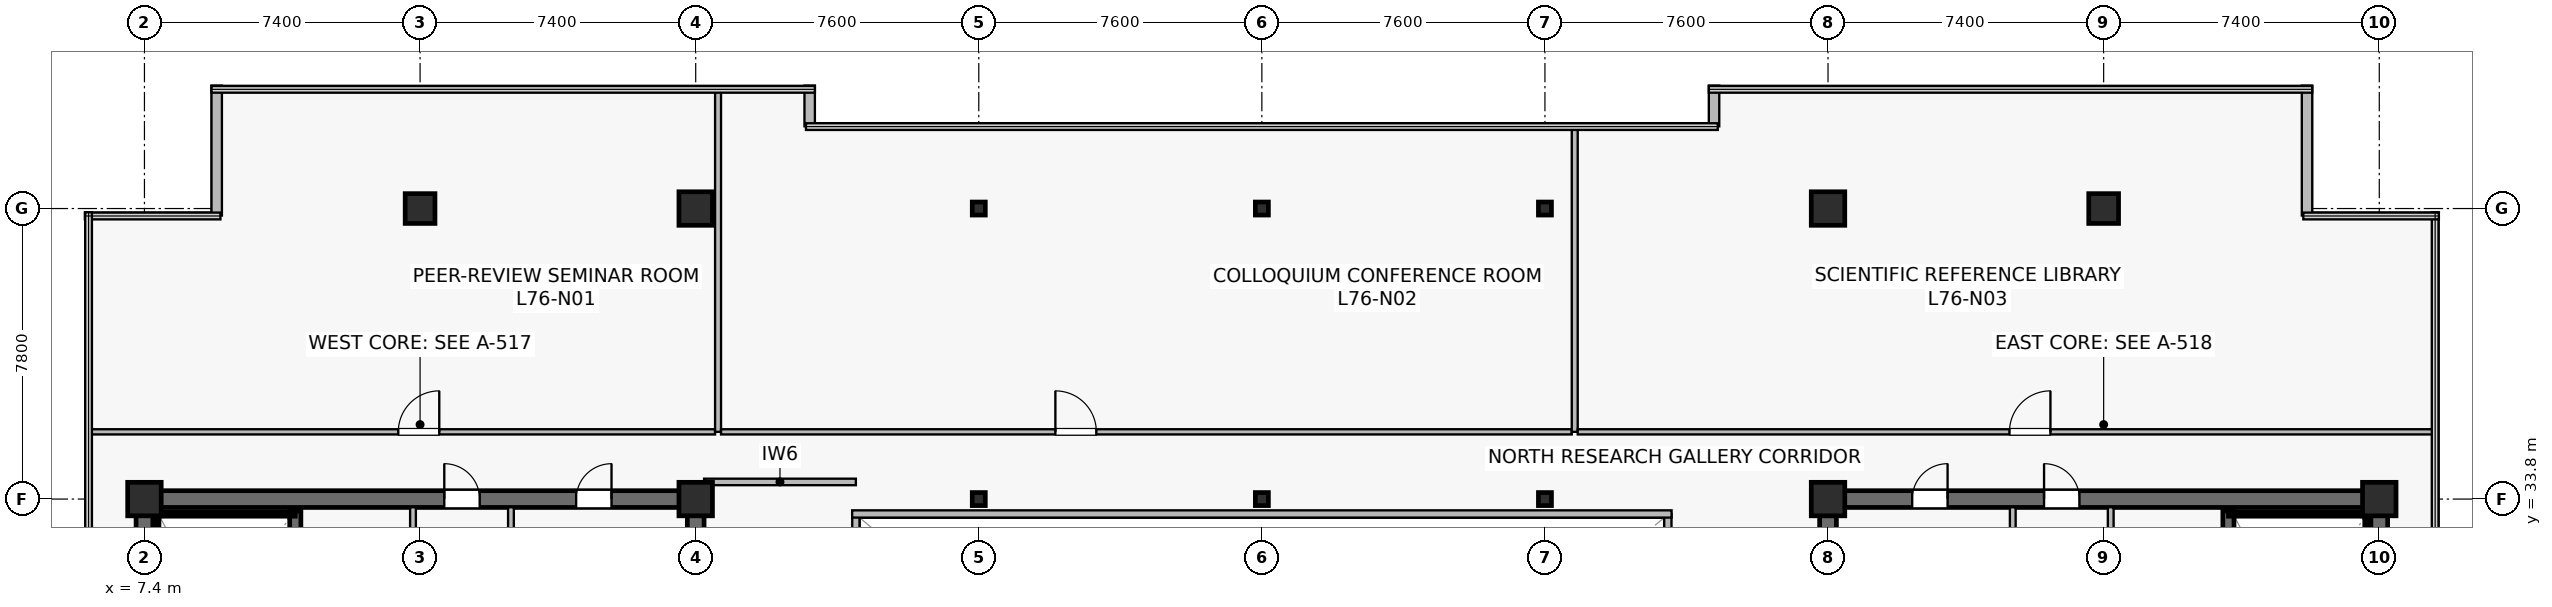
"""IFC4 building model, lengths in metres.
Left out: names, types, materials, properties, quantities, classifications, styles, units other than length and angle.
Written with IfcOpenShell. Run it as: python <this file> out.ifc"""

import sys

from ifc_helpers import new_model, si_unit, direction, frame, frame_2d, origin, origin_2d, place, context, subcontext, project, spatial, rectangle, i_section, extrude, source, transform, mapped, element, fill, save


model = new_model("IFC4")
c1 = context("Model", 3, precision=1e-05, world=origin(), true_north=direction((0.0, 1.0)))
c2 = subcontext(c1, "Body", "Model", "MODEL_VIEW")
j1 = project(units=[si_unit("LENGTHUNIT", "METRE"), si_unit("PLANEANGLEUNIT", "RADIAN")], contexts=[c1])
p1 = place(None, origin())
s1 = spatial("IfcSite", under=j1, at=p1, CompositionType="ELEMENT")
p2 = place(p1, origin())
s2 = spatial("IfcBuilding", under=s1, at=p2, CompositionType="ELEMENT")
p3 = place(p2, frame((0.0, 0.0, 318.6)))
s3 = spatial("IfcBuildingStorey", under=s2, at=p3, CompositionType="ELEMENT", Elevation=318.6)
p4 = place(p3, frame((7.175, 33.8, 0.0), z_axis=(0.0, 0.0, 1.0), x_axis=(1.0, 0.0, 0.0)))
e1 = element("IfcWall", 1, at=p4, inside=s3, PredefinedType="SHEAR", context=c2, shape_type="SweptSolid", body=[
    extrude(rectangle(XDim=15.25, YDim=0.45, at=frame_2d((7.625, 0.0))), origin(), (0.0, 0.0, 1.0), 3.9),
])
p5 = place(p4, frame((8.275, 0.0, 0.0)))
e2 = element("IfcOpeningElement", 2, at=p5, cuts=e1, PredefinedType="OPENING", context=c2, shape_type="SweptSolid", body=[
    extrude(rectangle(XDim=0.95, YDim=2.15, at=frame_2d((0.475, 1.075))), frame((0.0, 0.235, 0.0), z_axis=(0.0, -1.0, 0.0), x_axis=(1.0, 0.0, 0.0)), (0.0, 0.0, 1.0), 0.47),
])
p6 = place(p4, frame((11.815, 0.0, 0.0)))
e3 = element("IfcOpeningElement", 3, at=p6, cuts=e1, PredefinedType="OPENING", context=c2, shape_type="SweptSolid", body=[
    extrude(rectangle(XDim=0.95, YDim=2.15, at=frame_2d((0.475, 1.075))), frame((0.0, 0.235, 0.0), z_axis=(0.0, -1.0, 0.0), x_axis=(1.0, 0.0, 0.0)), (0.0, 0.0, 1.0), 0.47),
])
p7 = place(p3, frame((7.4, 15.025, 0.0), z_axis=(0.0, 0.0, 1.0), x_axis=(0.0, 1.0, 0.0)))
e4 = element("IfcWall", 4, at=p7, inside=s3, PredefinedType="SHEAR", context=c2, shape_type="SweptSolid", body=[
    extrude(rectangle(XDim=18.55, YDim=0.45, at=frame_2d((9.275, 0.0))), origin(), (0.0, 0.0, 1.0), 3.9),
])
p8 = place(p3, frame((22.2, 15.025, 0.0), z_axis=(0.0, 0.0, 1.0), x_axis=(0.0, 1.0, 0.0)))
e5 = element("IfcWall", 5, at=p8, inside=s3, PredefinedType="SHEAR", context=c2, shape_type="SweptSolid", body=[
    extrude(rectangle(XDim=18.55, YDim=0.45, at=frame_2d((9.275, 0.0))), origin(), (0.0, 0.0, 1.0), 3.9),
])
p9 = place(p8, frame((3.525, 0.0, 0.0)))
e6 = element("IfcOpeningElement", 6, at=p9, cuts=e5, PredefinedType="OPENING", context=c2, shape_type="SweptSolid", body=[
    extrude(rectangle(XDim=1.42, YDim=2.2, at=frame_2d((0.71, 1.1))), frame((0.0, 0.235, 0.0), z_axis=(0.0, -1.0, 0.0), x_axis=(1.0, 0.0, 0.0)), (0.0, 0.0, 1.0), 0.47),
])
p10 = place(p3, frame((11.45, 24.85, 0.0), z_axis=(0.0, 0.0, 1.0), x_axis=(0.0, 1.0, 0.0)))
e7 = element("IfcWall", 7, at=p10, inside=s3, PredefinedType="SHEAR", context=c2, shape_type="SweptSolid", body=[
    extrude(rectangle(XDim=8.63, YDim=0.3, at=frame_2d((4.315, 0.0))), origin(), (0.0, 0.0, 1.0), 3.9),
])
p11 = place(p10, frame((0.42, 0.0, 0.0)))
e8 = element("IfcOpeningElement", 8, at=p11, cuts=e7, PredefinedType="OPENING", context=c2, shape_type="SweptSolid", body=[
    extrude(rectangle(XDim=1.1, YDim=2.15, at=frame_2d((0.55, 1.075))), frame((0.0, 0.16, 0.0), z_axis=(0.0, -1.0, 0.0), x_axis=(1.0, 0.0, 0.0)), (0.0, 0.0, 1.0), 0.32),
])
p12 = place(p3, frame((7.73, 33.4, 0.0), z_axis=(0.0, 0.0, 1.0), x_axis=(1.0, 0.0, 0.0)))
e9 = element("IfcWall", 9, at=p12, inside=s3, PredefinedType="SOLIDWALL", context=c2, shape_type="SweptSolid", body=[
    extrude(rectangle(XDim=3.72, YDim=0.12, at=frame_2d((1.86, 0.0))), origin(), (0.0, 0.0, 1.0), 3.9),
])
p13 = place(p3, frame((7.73, 25.0, 0.0), z_axis=(0.0, 0.0, 1.0), x_axis=(0.0, 1.0, 0.0)))
e10 = element("IfcWall", 10, at=p13, inside=s3, PredefinedType="SOLIDWALL", context=c2, shape_type="SweptSolid", body=[
    extrude(rectangle(XDim=8.32, YDim=0.12, at=frame_2d((4.16, 0.0))), origin(), (0.0, 0.0, 1.0), 3.9),
])
p14 = place(p3, frame((52.375, 33.8, 0.0), z_axis=(0.0, 0.0, 1.0), x_axis=(1.0, 0.0, 0.0)))
e11 = element("IfcWall", 11, at=p14, inside=s3, PredefinedType="SHEAR", context=c2, shape_type="SweptSolid", body=[
    extrude(rectangle(XDim=15.25, YDim=0.45, at=frame_2d((7.625, 0.0))), origin(), (0.0, 0.0, 1.0), 3.9),
])
p15 = place(p14, frame((6.025, 0.0, 0.0)))
e12 = element("IfcOpeningElement", 12, at=p15, cuts=e11, PredefinedType="OPENING", context=c2, shape_type="SweptSolid", body=[
    extrude(rectangle(XDim=0.95, YDim=2.15, at=frame_2d((0.475, 1.075))), frame((0.0, 0.235, 0.0), z_axis=(0.0, -1.0, 0.0), x_axis=(1.0, 0.0, 0.0)), (0.0, 0.0, 1.0), 0.47),
])
p16 = place(p14, frame((2.485, 0.0, 0.0)))
e13 = element("IfcOpeningElement", 13, at=p16, cuts=e11, PredefinedType="OPENING", context=c2, shape_type="SweptSolid", body=[
    extrude(rectangle(XDim=0.95, YDim=2.15, at=frame_2d((0.475, 1.075))), frame((0.0, 0.235, 0.0), z_axis=(0.0, -1.0, 0.0), x_axis=(1.0, 0.0, 0.0)), (0.0, 0.0, 1.0), 0.47),
])
p17 = place(p3, frame((52.6, 15.025, 0.0), z_axis=(0.0, 0.0, 1.0), x_axis=(0.0, 1.0, 0.0)))
e14 = element("IfcWall", 14, at=p17, inside=s3, PredefinedType="SHEAR", context=c2, shape_type="SweptSolid", body=[
    extrude(rectangle(XDim=18.55, YDim=0.45, at=frame_2d((9.275, 0.0))), origin(), (0.0, 0.0, 1.0), 3.9),
])
p18 = place(p17, frame((3.525, 0.0, 0.0)))
e15 = element("IfcOpeningElement", 15, at=p18, cuts=e14, PredefinedType="OPENING", context=c2, shape_type="SweptSolid", body=[
    extrude(rectangle(XDim=1.42, YDim=2.2, at=frame_2d((0.71, 1.1))), frame((0.0, 0.235, 0.0), z_axis=(0.0, -1.0, 0.0), x_axis=(1.0, 0.0, 0.0)), (0.0, 0.0, 1.0), 0.47),
])
p19 = place(p3, frame((67.4, 15.025, 0.0), z_axis=(0.0, 0.0, 1.0), x_axis=(0.0, 1.0, 0.0)))
e16 = element("IfcWall", 16, at=p19, inside=s3, PredefinedType="SHEAR", context=c2, shape_type="SweptSolid", body=[
    extrude(rectangle(XDim=18.55, YDim=0.45, at=frame_2d((9.275, 0.0))), origin(), (0.0, 0.0, 1.0), 3.9),
])
p20 = place(p3, frame((63.35, 24.85, 0.0), z_axis=(0.0, 0.0, 1.0), x_axis=(0.0, 1.0, 0.0)))
e17 = element("IfcWall", 17, at=p20, inside=s3, PredefinedType="SHEAR", context=c2, shape_type="SweptSolid", body=[
    extrude(rectangle(XDim=8.63, YDim=0.3, at=frame_2d((4.315, 0.0))), origin(), (0.0, 0.0, 1.0), 3.9),
])
p21 = place(p20, frame((0.42, 0.0, 0.0)))
e18 = element("IfcOpeningElement", 18, at=p21, cuts=e17, PredefinedType="OPENING", context=c2, shape_type="SweptSolid", body=[
    extrude(rectangle(XDim=1.1, YDim=2.15, at=frame_2d((0.55, 1.075))), frame((0.0, 0.16, 0.0), z_axis=(0.0, -1.0, 0.0), x_axis=(1.0, 0.0, 0.0)), (0.0, 0.0, 1.0), 0.32),
])
p22 = place(p3, frame((63.35, 33.4, 0.0), z_axis=(0.0, 0.0, 1.0), x_axis=(1.0, 0.0, 0.0)))
e19 = element("IfcWall", 19, at=p22, inside=s3, PredefinedType="SOLIDWALL", context=c2, shape_type="SweptSolid", body=[
    extrude(rectangle(XDim=3.72, YDim=0.12, at=frame_2d((1.86, 0.0))), origin(), (0.0, 0.0, 1.0), 3.9),
])
p23 = place(p3, frame((67.07, 25.0, 0.0), z_axis=(0.0, 0.0, 1.0), x_axis=(0.0, 1.0, 0.0)))
e20 = element("IfcWall", 20, at=p23, inside=s3, PredefinedType="SOLIDWALL", context=c2, shape_type="SweptSolid", body=[
    extrude(rectangle(XDim=8.32, YDim=0.12, at=frame_2d((4.16, 0.0))), origin(), (0.0, 0.0, 1.0), 3.9),
])
m1 = source(origin(), c2, "Body", "SweptSolid", [
    extrude(rectangle(XDim=0.9, YDim=0.9, at=origin_2d()), origin(), (0.0, 0.0, 1.0), 4.2),
])
for number, where, z_axis, x_axis in (
    (21, (7.4, 33.8, 0.0), (0.0, 0.0, 1.0), (1.0, 0.0, 0.0)),
    (22, (22.2, 33.8, 0.0), (0.0, 0.0, 1.0), (1.0, 0.0, 0.0)),
):
    element("IfcColumn", number, at=place(p3, frame(where, z_axis=z_axis, x_axis=x_axis)), inside=s3, PredefinedType="COLUMN", context=c2, shape_type="MappedRepresentation", body=[
        mapped(m1, transform((0.0, 0.0, 0.0), scale=1.0)),
    ])
m2 = source(origin(), c2, "Body", "SweptSolid", [
    extrude(rectangle(XDim=0.8, YDim=0.8, at=origin_2d()), origin(), (0.0, 0.0, 1.0), 4.2),
])
p24 = place(p3, frame((14.8, 41.6, 0.0), z_axis=(0.0, 0.0, 1.0), x_axis=(1.0, 0.0, 0.0)))
e23 = element("IfcColumn", 23, at=p24, inside=s3, PredefinedType="COLUMN", context=c2, shape_type="MappedRepresentation", body=[
    mapped(m2, transform((0.0, 0.0, 0.0), scale=1.0)),
])
for number, where, z_axis, x_axis in (
    (24, (22.2, 41.6, 0.0), (0.0, 0.0, 1.0), (1.0, 0.0, 0.0)),
    (25, (52.6, 33.8, 0.0), (0.0, 0.0, 1.0), (1.0, 0.0, 0.0)),
    (26, (67.4, 33.8, 0.0), (0.0, 0.0, 1.0), (1.0, 0.0, 0.0)),
    (27, (52.6, 41.6, 0.0), (0.0, 0.0, 1.0), (1.0, 0.0, 0.0)),
):
    element("IfcColumn", number, at=place(p3, frame(where, z_axis=z_axis, x_axis=x_axis)), inside=s3, PredefinedType="COLUMN", context=c2, shape_type="MappedRepresentation", body=[
        mapped(m1, transform((0.0, 0.0, 0.0), scale=1.0)),
    ])
p25 = place(p3, frame((60.0, 41.6, 0.0), z_axis=(0.0, 0.0, 1.0), x_axis=(1.0, 0.0, 0.0)))
e28 = element("IfcColumn", 28, at=p25, inside=s3, PredefinedType="COLUMN", context=c2, shape_type="MappedRepresentation", body=[
    mapped(m2, transform((0.0, 0.0, 0.0), scale=1.0)),
])
m3 = source(origin(), c2, "Body", "SweptSolid", [
    extrude(i_section(OverallWidth=0.35, OverallDepth=0.35, WebThickness=0.012, FlangeThickness=0.019, at=origin_2d()), origin(), (0.0, 0.0, 1.0), 4.2),
])
for number, where, z_axis, x_axis in (
    (29, (29.8, 33.8, 0.0), (0.0, 0.0, 1.0), (1.0, 0.0, 0.0)),
    (30, (29.8, 41.6, 0.0), (0.0, 0.0, 1.0), (1.0, 0.0, 0.0)),
    (31, (37.4, 33.8, 0.0), (0.0, 0.0, 1.0), (1.0, 0.0, 0.0)),
    (32, (37.4, 41.6, 0.0), (0.0, 0.0, 1.0), (1.0, 0.0, 0.0)),
    (33, (45.0, 33.8, 0.0), (0.0, 0.0, 1.0), (1.0, 0.0, 0.0)),
    (34, (45.0, 41.6, 0.0), (0.0, 0.0, 1.0), (1.0, 0.0, 0.0)),
):
    element("IfcColumn", number, at=place(p3, frame(where, z_axis=z_axis, x_axis=x_axis)), inside=s3, PredefinedType="COLUMN", context=c2, shape_type="MappedRepresentation", body=[
        mapped(m3, transform((0.0, 0.0, 0.0), scale=1.0)),
    ])
p26 = place(p3, frame((65.46, 41.412, 0.0), z_axis=(0.0, 0.0, 1.0), x_axis=(0.0, 1.0, 0.0)))
e35 = element("IfcWall", 35, at=p26, inside=s3, PredefinedType="STANDARD", context=c2, shape_type="SweptSolid", body=[
    extrude(rectangle(XDim=3.488, YDim=0.28, at=frame_2d((1.744, 0.0))), origin(), (0.0, 0.0, 1.0), 3.9),
])
for number, where, z_axis, x_axis in (
    (36, (49.54, 44.9, 0.0), (0.0, 0.0, 1.0), (0.0, -1.0, 0.0)),
    (37, (25.26, 43.807, 0.0), (0.0, 0.0, 1.0), (0.0, 1.0, 0.0)),
):
    element("IfcWall", number, at=place(p3, frame(where, z_axis=z_axis, x_axis=x_axis)), inside=s3, PredefinedType="STANDARD", context=c2, shape_type="SweptSolid", body=[
        extrude(rectangle(XDim=1.093, YDim=0.28, at=frame_2d((0.546, 0.0))), origin(), (0.0, 0.0, 1.0), 3.9),
    ])
p27 = place(p3, frame((9.34, 44.9, 0.0), z_axis=(0.0, 0.0, 1.0), x_axis=(0.0, -1.0, 0.0)))
e38 = element("IfcWall", 38, at=p27, inside=s3, PredefinedType="STANDARD", context=c2, shape_type="SweptSolid", body=[
    extrude(rectangle(XDim=3.488, YDim=0.28, at=frame_2d((1.744, 0.0))), origin(), (0.0, 0.0, 1.0), 3.9),
])
p28 = place(p3, frame((14.61, 29.65, 0.0), z_axis=(0.0, 0.0, 1.0), x_axis=(0.0, 1.0, 0.0)))
e39 = element("IfcWall", 39, at=p28, inside=s3, PredefinedType="PLUMBINGWALL", context=c2, shape_type="SweptSolid", body=[
    extrude(rectangle(XDim=3.93, YDim=0.155, at=frame_2d((1.965, 0.0))), origin(), (0.0, 0.0, 1.0), 3.297),
])
p29 = place(p3, frame((17.24, 29.65, 0.0), z_axis=(0.0, 0.0, 1.0), x_axis=(0.0, 1.0, 0.0)))
e40 = element("IfcWall", 40, at=p29, inside=s3, PredefinedType="PLUMBINGWALL", context=c2, shape_type="SweptSolid", body=[
    extrude(rectangle(XDim=3.93, YDim=0.155, at=frame_2d((1.965, 0.0))), origin(), (0.0, 0.0, 1.0), 3.9),
])
p30 = place(p3, frame((60.19, 29.65, 0.0), z_axis=(0.0, 0.0, 1.0), x_axis=(0.0, 1.0, 0.0)))
e41 = element("IfcWall", 41, at=p30, inside=s3, PredefinedType="PLUMBINGWALL", context=c2, shape_type="SweptSolid", body=[
    extrude(rectangle(XDim=3.93, YDim=0.155, at=frame_2d((1.965, 0.0))), origin(), (0.0, 0.0, 1.0), 3.297),
])
p31 = place(p3, frame((57.56, 29.65, 0.0), z_axis=(0.0, 0.0, 1.0), x_axis=(0.0, 1.0, 0.0)))
e42 = element("IfcWall", 42, at=p31, inside=s3, PredefinedType="PLUMBINGWALL", context=c2, shape_type="SweptSolid", body=[
    extrude(rectangle(XDim=3.93, YDim=0.155, at=frame_2d((1.965, 0.0))), origin(), (0.0, 0.0, 1.0), 3.9),
])
p32 = place(p3, frame((22.425, 34.26, 0.0), z_axis=(0.0, 0.0, 1.0), x_axis=(1.0, 0.0, 0.0)))
e43 = element("IfcWall", 43, at=p32, inside=s3, PredefinedType="PARTITIONING", context=c2, shape_type="SweptSolid", body=[
    extrude(rectangle(XDim=4.075, YDim=0.175, at=frame_2d((2.038, 0.0))), origin(), (0.0, 0.0, 1.0), 3.635),
])
p33 = place(p3, frame((26.5, 15.2, 0.0), z_axis=(0.0, 0.0, 1.0), x_axis=(0.0, 1.0, 0.0)))
e44 = element("IfcWall", 44, at=p33, inside=s3, PredefinedType="SOLIDWALL", context=c2, shape_type="SweptSolid", body=[
    extrude(rectangle(XDim=18.2, YDim=0.195, at=frame_2d((9.1, 0.0))), origin(), (0.0, 0.0, 1.0), 3.9),
])
p34 = place(p33, frame((1.8, 0.0, 0.9)))
e45 = element("IfcOpeningElement", 45, at=p34, cuts=e44, PredefinedType="OPENING", context=c2, shape_type="SweptSolid", body=[
    extrude(rectangle(XDim=1.5, YDim=1.4, at=frame_2d((0.75, 0.7))), frame((0.0, 0.107, 0.0), z_axis=(0.0, -1.0, 0.0), x_axis=(1.0, 0.0, 0.0)), (0.0, 0.0, 1.0), 0.215),
])
p35 = place(p33, frame((13.2, 0.0, 0.9)))
e46 = element("IfcOpeningElement", 46, at=p35, cuts=e44, PredefinedType="OPENING", context=c2, shape_type="SweptSolid", body=[
    extrude(rectangle(XDim=1.5, YDim=1.4, at=frame_2d((0.75, 0.7))), frame((0.0, 0.107, 0.0), z_axis=(0.0, -1.0, 0.0), x_axis=(1.0, 0.0, 0.0)), (0.0, 0.0, 1.0), 0.215),
])
p36 = place(p3, frame((48.3, 15.2, 0.0), z_axis=(0.0, 0.0, 1.0), x_axis=(0.0, 1.0, 0.0)))
e47 = element("IfcWall", 47, at=p36, inside=s3, PredefinedType="SOLIDWALL", context=c2, shape_type="SweptSolid", body=[
    extrude(rectangle(XDim=18.2, YDim=0.195, at=frame_2d((9.1, 0.0))), origin(), (0.0, 0.0, 1.0), 3.9),
])
p37 = place(p36, frame((1.8, 0.0, 0.9)))
e48 = element("IfcOpeningElement", 48, at=p37, cuts=e47, PredefinedType="OPENING", context=c2, shape_type="SweptSolid", body=[
    extrude(rectangle(XDim=1.5, YDim=1.4, at=frame_2d((0.75, 0.7))), frame((0.0, 0.107, 0.0), z_axis=(0.0, -1.0, 0.0), x_axis=(1.0, 0.0, 0.0)), (0.0, 0.0, 1.0), 0.215),
])
p38 = place(p36, frame((13.2, 0.0, 0.9)))
e49 = element("IfcOpeningElement", 49, at=p38, cuts=e47, PredefinedType="OPENING", context=c2, shape_type="SweptSolid", body=[
    extrude(rectangle(XDim=1.5, YDim=1.4, at=frame_2d((0.75, 0.7))), frame((0.0, 0.107, 0.0), z_axis=(0.0, -1.0, 0.0), x_axis=(1.0, 0.0, 0.0)), (0.0, 0.0, 1.0), 0.215),
])
p39 = place(p3, frame((26.4, 33.4, 0.0), z_axis=(0.0, 0.0, 1.0), x_axis=(1.0, 0.0, 0.0)))
e50 = element("IfcWall", 50, at=p39, inside=s3, PredefinedType="SOLIDWALL", context=c2, shape_type="SweptSolid", body=[
    extrude(rectangle(XDim=22.0, YDim=0.195, at=frame_2d((11.0, 0.0))), origin(), (0.0, 0.0, 1.0), 3.9),
])
p40 = place(p3, frame((5.91, 35.605, 0.0), z_axis=(0.0, 0.0, 1.0), x_axis=(1.0, 0.0, 0.0)))
e51 = element("IfcWall", 51, at=p40, inside=s3, PredefinedType="PARTITIONING", context=c2, shape_type="SweptSolid", body=[
    extrude(rectangle(XDim=16.81, YDim=0.14, at=frame_2d((8.405, 0.0))), origin(), (0.0, 0.0, 1.0), 3.297),
])
p41 = place(p40, frame((8.305, 0.0, 0.0)))
e52 = element("IfcOpeningElement", 52, at=p41, cuts=e51, PredefinedType="OPENING", context=c2, shape_type="SweptSolid", body=[
    extrude(rectangle(XDim=1.1, YDim=2.18, at=frame_2d((0.55, 1.09))), frame((0.0, 0.08, 0.0), z_axis=(0.0, -1.0, 0.0), x_axis=(1.0, 0.0, 0.0)), (0.0, 0.0, 1.0), 0.16),
])
p42 = place(p3, frame((22.8, 35.605, 0.0), z_axis=(0.0, 0.0, 1.0), x_axis=(0.0, 1.0, 0.0)))
e53 = element("IfcWall", 53, at=p42, inside=s3, PredefinedType="PARTITIONING", context=c2, shape_type="SweptSolid", body=[
    extrude(rectangle(XDim=9.185, YDim=0.16, at=frame_2d((4.593, 0.0))), origin(), (0.0, 0.0, 1.0), 3.235),
])
p43 = place(p3, frame((22.88, 35.605, 0.0), z_axis=(0.0, 0.0, 1.0), x_axis=(1.0, 0.0, 0.0)))
e54 = element("IfcWall", 54, at=p43, inside=s3, PredefinedType="PARTITIONING", context=c2, shape_type="SweptSolid", body=[
    extrude(rectangle(XDim=22.84, YDim=0.14, at=frame_2d((11.42, 0.0))), origin(), (0.0, 0.0, 1.0), 3.297),
])
p44 = place(p43, frame((8.976, 0.0, 0.0)))
e55 = element("IfcOpeningElement", 55, at=p44, cuts=e54, PredefinedType="OPENING", context=c2, shape_type="SweptSolid", body=[
    extrude(rectangle(XDim=1.1, YDim=2.18, at=frame_2d((0.55, 1.09))), frame((0.0, 0.08, 0.0), z_axis=(0.0, -1.0, 0.0), x_axis=(1.0, 0.0, 0.0)), (0.0, 0.0, 1.0), 0.16),
])
p45 = place(p3, frame((45.8, 35.605, 0.0), z_axis=(0.0, 0.0, 1.0), x_axis=(0.0, 1.0, 0.0)))
e56 = element("IfcWall", 56, at=p45, inside=s3, PredefinedType="PARTITIONING", context=c2, shape_type="SweptSolid", body=[
    extrude(rectangle(XDim=8.185, YDim=0.16, at=frame_2d((4.093, 0.0))), origin(), (0.0, 0.0, 1.0), 3.235),
])
p46 = place(p3, frame((45.88, 35.605, 0.0), z_axis=(0.0, 0.0, 1.0), x_axis=(1.0, 0.0, 0.0)))
e57 = element("IfcWall", 57, at=p46, inside=s3, PredefinedType="PARTITIONING", context=c2, shape_type="SweptSolid", body=[
    extrude(rectangle(XDim=23.01, YDim=0.14, at=frame_2d((11.505, 0.0))), origin(), (0.0, 0.0, 1.0), 3.297),
])
p47 = place(p46, frame((11.591, 0.0, 0.0)))
e58 = element("IfcOpeningElement", 58, at=p47, cuts=e57, PredefinedType="OPENING", context=c2, shape_type="SweptSolid", body=[
    extrude(rectangle(XDim=1.1, YDim=2.18, at=frame_2d((0.55, 1.09))), frame((0.0, 0.08, 0.0), z_axis=(0.0, -1.0, 0.0), x_axis=(1.0, 0.0, 0.0)), (0.0, 0.0, 1.0), 0.16),
])
m4 = source(origin(), c2, "Body", "SweptSolid", [
    extrude(rectangle(XDim=0.95, YDim=2.15, at=frame_2d((0.475, 1.075))), frame((0.0, 0.025, 0.0), z_axis=(0.0, -1.0, 0.0), x_axis=(1.0, 0.0, 0.0)), (0.0, 0.0, 1.0), 0.05),
])
p48 = place(p5, origin())
e59 = element("IfcDoor", 59, at=p48, inside=s3, OperationType="SINGLE_SWING_LEFT", PredefinedType="DOOR", context=c2, shape_type="MappedRepresentation", body=[
    mapped(m4, transform((0.0, 0.0, 0.0), scale=1.0)),
])
fill(e2, e59)
p49 = place(p6, origin())
e60 = element("IfcDoor", 60, at=p49, inside=s3, OperationType="SINGLE_SWING_RIGHT", PredefinedType="DOOR", context=c2, shape_type="MappedRepresentation", body=[
    mapped(m4, transform((0.0, 0.0, 0.0), scale=1.0)),
])
fill(e3, e60)
p50 = place(p15, origin())
e61 = element("IfcDoor", 61, at=p50, inside=s3, OperationType="SINGLE_SWING_LEFT", PredefinedType="DOOR", context=c2, shape_type="MappedRepresentation", body=[
    mapped(m4, transform((0.0, 0.0, 0.0), scale=1.0)),
])
fill(e12, e61)
p51 = place(p16, origin())
e62 = element("IfcDoor", 62, at=p51, inside=s3, OperationType="SINGLE_SWING_RIGHT", PredefinedType="DOOR", context=c2, shape_type="MappedRepresentation", body=[
    mapped(m4, transform((0.0, 0.0, 0.0), scale=1.0)),
])
fill(e13, e62)
m5 = source(origin(), c2, "Body", "SweptSolid", [
    extrude(rectangle(XDim=1.1, YDim=2.18, at=frame_2d((0.55, 1.09))), frame((0.0, 0.025, 0.0), z_axis=(0.0, -1.0, 0.0), x_axis=(1.0, 0.0, 0.0)), (0.0, 0.0, 1.0), 0.05),
])
p52 = place(p41, origin())
e63 = element("IfcDoor", 63, at=p52, inside=s3, OperationType="SINGLE_SWING_RIGHT", PredefinedType="DOOR", context=c2, shape_type="MappedRepresentation", body=[
    mapped(m5, transform((0.0, 0.0, 0.0), scale=1.0)),
])
fill(e52, e63)
p53 = place(p44, origin())
e64 = element("IfcDoor", 64, at=p53, inside=s3, OperationType="SINGLE_SWING_LEFT", PredefinedType="DOOR", context=c2, shape_type="MappedRepresentation", body=[
    mapped(m5, transform((0.0, 0.0, 0.0), scale=1.0)),
])
fill(e55, e64)
p54 = place(p47, origin())
e65 = element("IfcDoor", 65, at=p54, inside=s3, OperationType="SINGLE_SWING_RIGHT", PredefinedType="DOOR", context=c2, shape_type="MappedRepresentation", body=[
    mapped(m5, transform((0.0, 0.0, 0.0), scale=1.0)),
])
fill(e58, e65)
save(model, sys.argv[1])
